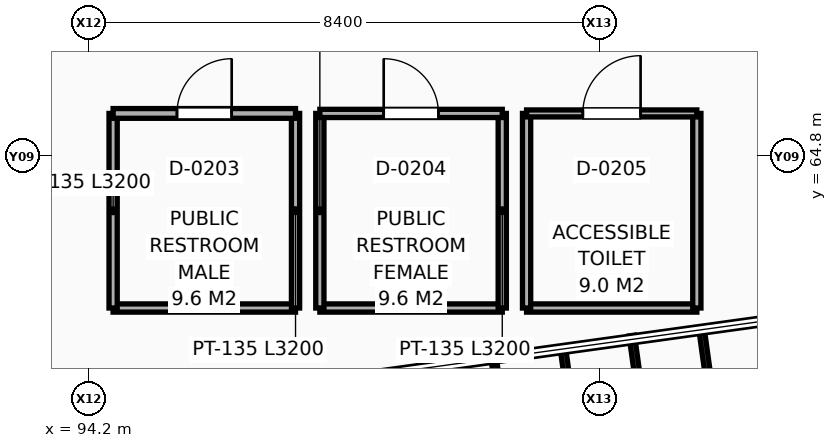
"""IFC4 building model, lengths in metres.
Left out: names, types, materials, properties, quantities, classifications, styles, units other than length and angle.
Written with IfcOpenShell. Run it as: python <this file> out.ifc"""

import sys

from ifc_helpers import new_model, si_unit, direction, frame, frame_2d, origin, place, context, subcontext, project, spatial, rectangle, extrude, element, fill, save


model = new_model("IFC4")
c1 = context("Model", 3, precision=1e-05, world=origin(), true_north=direction((0.0, 1.0)))
c2 = subcontext(c1, "Body", "Model", "MODEL_VIEW")
j1 = project(units=[si_unit("LENGTHUNIT", "METRE"), si_unit("PLANEANGLEUNIT", "RADIAN")], contexts=[c1])
p1 = place(None, origin())
s1 = spatial("IfcSite", under=j1, at=p1, CompositionType="ELEMENT")
p2 = place(p1, origin())
s2 = spatial("IfcBuilding", under=s1, at=p2, CompositionType="ELEMENT")
p3 = place(p2, frame((0.0, 0.0, 9.6)))
s3 = spatial("IfcBuildingStorey", under=s2, at=p3, CompositionType="ELEMENT", Elevation=9.6)
p4 = place(p3, frame((94.6, 62.3, 0.0), z_axis=(0.0, 0.0, 1.0), x_axis=(1.0, 0.0, 0.0)))
e1 = element("IfcWall", 1, at=p4, inside=s3, PredefinedType="PARTITIONING", context=c2, shape_type="SweptSolid", body=[
    extrude(rectangle(XDim=3.0, YDim=0.135, at=frame_2d((1.5, 0.0))), origin(), (0.0, 0.0, 1.0), 3.86),
])
for number, where, z_axis, x_axis in (
    (2, (97.6, 62.3, 0.0), (0.0, 0.0, 1.0), (0.0, 1.0, 0.0)),
    (3, (94.6, 62.3, 0.0), (0.0, 0.0, 1.0), (0.0, 1.0, 0.0)),
):
    element("IfcWall", number, at=place(p3, frame(where, z_axis=z_axis, x_axis=x_axis)), inside=s3, PredefinedType="PARTITIONING", context=c2, shape_type="SweptSolid", body=[
        extrude(rectangle(XDim=3.2, YDim=0.135, at=frame_2d((1.6, 0.0))), origin(), (0.0, 0.0, 1.0), 3.86),
    ])
p5 = place(p3, frame((94.6, 65.5, 0.0), z_axis=(0.0, 0.0, 1.0), x_axis=(1.0, 0.0, 0.0)))
e4 = element("IfcWall", 4, at=p5, inside=s3, PredefinedType="PARTITIONING", context=c2, shape_type="SweptSolid", body=[
    extrude(rectangle(XDim=3.0, YDim=0.16, at=frame_2d((1.5, 0.0))), origin(), (0.0, 0.0, 1.0), 3.86),
])
p6 = place(p5, frame((1.05, 0.0, 0.0)))
e5 = element("IfcOpeningElement", 5, at=p6, cuts=e4, PredefinedType="OPENING", context=c2, shape_type="SweptSolid", body=[
    extrude(rectangle(XDim=0.9, YDim=2.1, at=frame_2d((0.45, 1.05))), frame((0.0, 0.09, 0.0), z_axis=(0.0, -1.0, 0.0), x_axis=(1.0, 0.0, 0.0)), (0.0, 0.0, 1.0), 0.18),
])
p7 = place(p3, frame((98.0, 62.3, 0.0), z_axis=(0.0, 0.0, 1.0), x_axis=(1.0, 0.0, 0.0)))
e6 = element("IfcWall", 6, at=p7, inside=s3, PredefinedType="PARTITIONING", context=c2, shape_type="SweptSolid", body=[
    extrude(rectangle(XDim=3.0, YDim=0.135, at=frame_2d((1.5, 0.0))), origin(), (0.0, 0.0, 1.0), 3.86),
])
for number, where, z_axis, x_axis in (
    (7, (101.0, 62.3, 0.0), (0.0, 0.0, 1.0), (0.0, 1.0, 0.0)),
    (8, (98.0, 62.3, 0.0), (0.0, 0.0, 1.0), (0.0, 1.0, 0.0)),
):
    element("IfcWall", number, at=place(p3, frame(where, z_axis=z_axis, x_axis=x_axis)), inside=s3, PredefinedType="PARTITIONING", context=c2, shape_type="SweptSolid", body=[
        extrude(rectangle(XDim=3.2, YDim=0.135, at=frame_2d((1.6, 0.0))), origin(), (0.0, 0.0, 1.0), 3.86),
    ])
p8 = place(p3, frame((98.0, 65.5, 0.0), z_axis=(0.0, 0.0, 1.0), x_axis=(1.0, 0.0, 0.0)))
e9 = element("IfcWall", 9, at=p8, inside=s3, PredefinedType="PARTITIONING", context=c2, shape_type="SweptSolid", body=[
    extrude(rectangle(XDim=3.0, YDim=0.135, at=frame_2d((1.5, 0.0))), origin(), (0.0, 0.0, 1.0), 3.86),
])
p9 = place(p8, frame((1.05, 0.0, 0.0)))
e10 = element("IfcOpeningElement", 10, at=p9, cuts=e9, PredefinedType="OPENING", context=c2, shape_type="SweptSolid", body=[
    extrude(rectangle(XDim=0.9, YDim=2.1, at=frame_2d((0.45, 1.05))), frame((0.0, 0.077, 0.0), z_axis=(0.0, -1.0, 0.0), x_axis=(1.0, 0.0, 0.0)), (0.0, 0.0, 1.0), 0.155),
])
p10 = place(p3, frame((101.4, 62.3, 0.0), z_axis=(0.0, 0.0, 1.0), x_axis=(1.0, 0.0, 0.0)))
e11 = element("IfcWall", 11, at=p10, inside=s3, PredefinedType="PARTITIONING", context=c2, shape_type="SweptSolid", body=[
    extrude(rectangle(XDim=2.8, YDim=0.135, at=frame_2d((1.4, 0.0))), origin(), (0.0, 0.0, 1.0), 3.86),
])
for number, where, z_axis, x_axis in (
    (12, (104.2, 62.3, 0.0), (0.0, 0.0, 1.0), (0.0, 1.0, 0.0)),
    (13, (101.4, 62.3, 0.0), (0.0, 0.0, 1.0), (0.0, 1.0, 0.0)),
):
    element("IfcWall", number, at=place(p3, frame(where, z_axis=z_axis, x_axis=x_axis)), inside=s3, PredefinedType="PARTITIONING", context=c2, shape_type="SweptSolid", body=[
        extrude(rectangle(XDim=3.2, YDim=0.135, at=frame_2d((1.6, 0.0))), origin(), (0.0, 0.0, 1.0), 3.86),
    ])
p11 = place(p3, frame((101.4, 65.5, 0.0), z_axis=(0.0, 0.0, 1.0), x_axis=(1.0, 0.0, 0.0)))
e14 = element("IfcWall", 14, at=p11, inside=s3, PredefinedType="PARTITIONING", context=c2, shape_type="SweptSolid", body=[
    extrude(rectangle(XDim=2.8, YDim=0.115, at=frame_2d((1.4, 0.0))), origin(), (0.0, 0.0, 1.0), 3.664),
])
p12 = place(p11, frame((0.925, 0.0, 0.0)))
e15 = element("IfcOpeningElement", 15, at=p12, cuts=e14, PredefinedType="OPENING", context=c2, shape_type="SweptSolid", body=[
    extrude(rectangle(XDim=0.95, YDim=2.1, at=frame_2d((0.475, 1.05))), frame((0.0, 0.067, 0.0), z_axis=(0.0, -1.0, 0.0), x_axis=(1.0, 0.0, 0.0)), (0.0, 0.0, 1.0), 0.135),
])
p13 = place(p6, origin())
e16 = element("IfcDoor", 16, at=p13, inside=s3, OperationType="SINGLE_SWING_RIGHT", PredefinedType="DOOR", context=c2, shape_type="SweptSolid", body=[
    extrude(rectangle(XDim=0.9, YDim=2.1, at=frame_2d((0.45, 1.05))), frame((0.0, 0.025, 0.0), z_axis=(0.0, -1.0, 0.0), x_axis=(1.0, 0.0, 0.0)), (0.0, 0.0, 1.0), 0.05),
])
fill(e5, e16)
p14 = place(p9, origin())
e17 = element("IfcDoor", 17, at=p14, inside=s3, OperationType="SINGLE_SWING_LEFT", PredefinedType="DOOR", context=c2, shape_type="SweptSolid", body=[
    extrude(rectangle(XDim=0.9, YDim=2.1, at=frame_2d((0.45, 1.05))), frame((0.0, 0.025, 0.0), z_axis=(0.0, -1.0, 0.0), x_axis=(1.0, 0.0, 0.0)), (0.0, 0.0, 1.0), 0.05),
])
fill(e10, e17)
p15 = place(p12, origin())
e18 = element("IfcDoor", 18, at=p15, inside=s3, OperationType="SINGLE_SWING_RIGHT", PredefinedType="DOOR", context=c2, shape_type="SweptSolid", body=[
    extrude(rectangle(XDim=0.95, YDim=2.1, at=frame_2d((0.475, 1.05))), frame((0.0, 0.025, 0.0), z_axis=(0.0, -1.0, 0.0), x_axis=(1.0, 0.0, 0.0)), (0.0, 0.0, 1.0), 0.05),
])
fill(e15, e18)
save(model, sys.argv[1])
